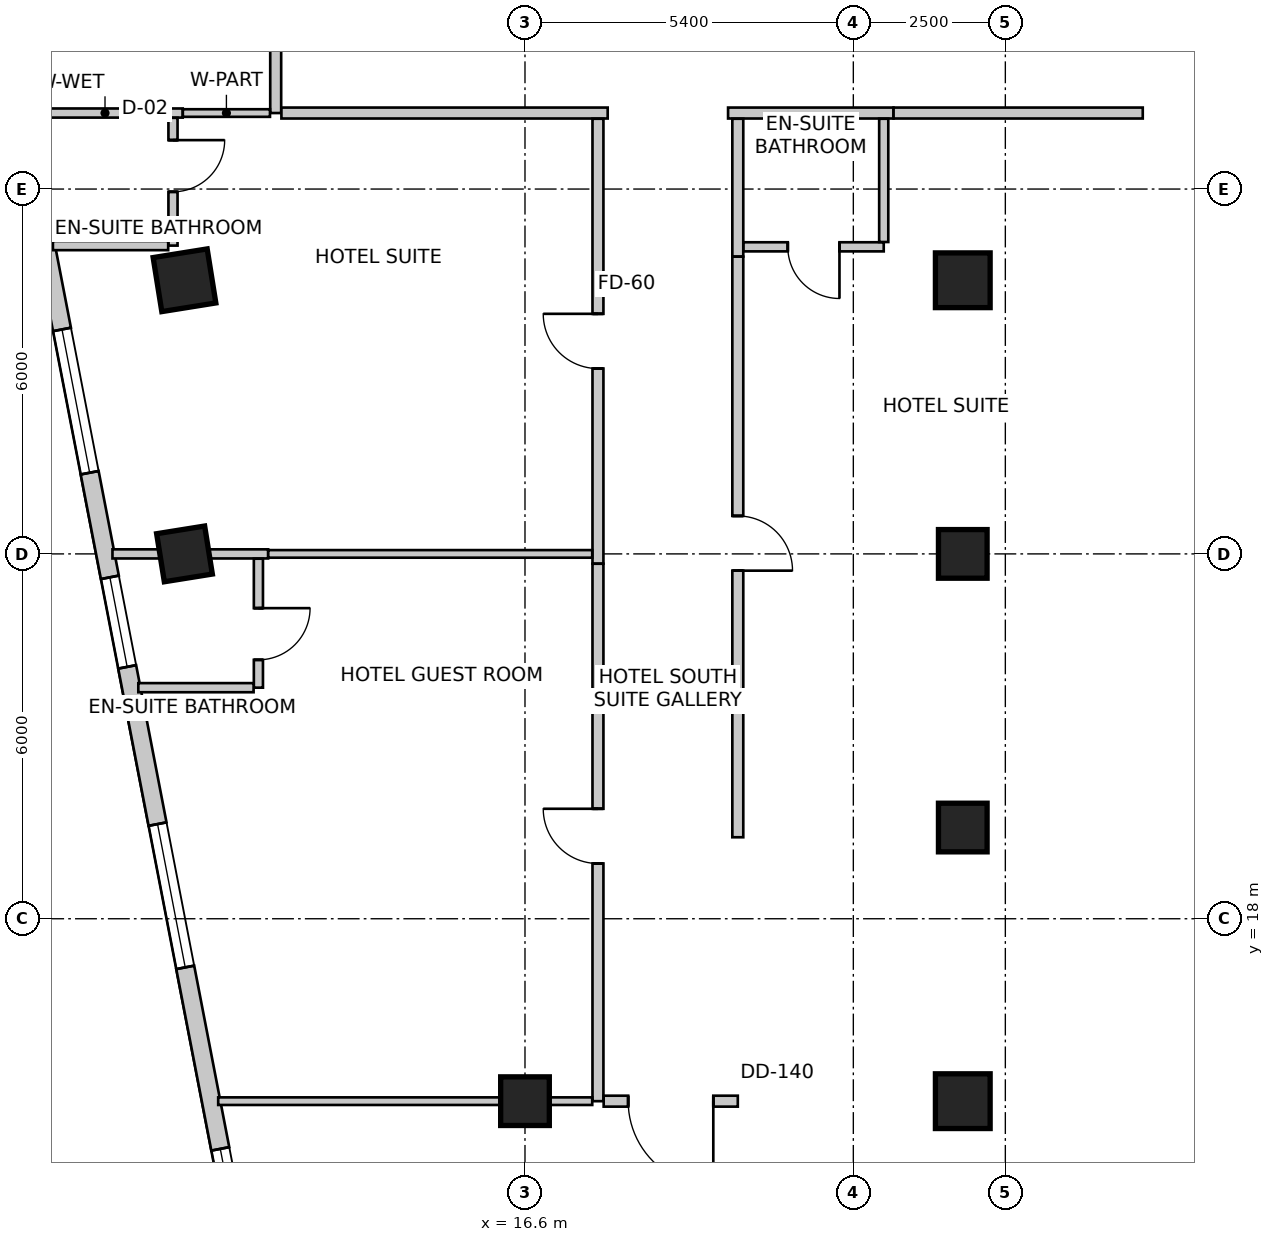
"""IFC4 building model, lengths in metres.
Left out: names, types, materials, properties, quantities, classifications, styles, units other than length and angle.
Written with IfcOpenShell. Run it as: python <this file> out.ifc"""

import sys

from ifc_helpers import new_model, si_unit, direction, frame, frame_2d, origin, origin_2d, place, context, subcontext, project, spatial, rectangle, extrude, source, transform, mapped, element, fill, save


model = new_model("IFC4")
c1 = context("Model", 3, precision=1e-05, world=origin(), true_north=direction((0.0, 1.0)))
c2 = subcontext(c1, "Body", "Model", "MODEL_VIEW")
j1 = project(units=[si_unit("LENGTHUNIT", "METRE"), si_unit("PLANEANGLEUNIT", "RADIAN")], contexts=[c1])
p1 = place(None, origin())
s1 = spatial("IfcSite", under=j1, at=p1, CompositionType="ELEMENT")
p2 = place(p1, origin())
s2 = spatial("IfcBuilding", under=s1, at=p2, CompositionType="ELEMENT")
p3 = place(p2, frame((0.0, 0.0, 135.8)))
s3 = spatial("IfcBuildingStorey", under=s2, at=p3, CompositionType="ELEMENT", Elevation=135.8)
m1 = source(origin(), c2, "Body", "SweptSolid", [
    extrude(rectangle(XDim=0.9, YDim=0.9, at=origin_2d()), origin(), (0.0, 0.0, 1.0), 3.6),
])
p4 = place(p3, frame((11.0, 28.5, 0.0), z_axis=(0.0, 0.0, 1.0), x_axis=(0.158158067254, -0.987413806751, 0.0)))
e1 = element("IfcColumn", 1, at=p4, inside=s3, PredefinedType="COLUMN", context=c2, shape_type="MappedRepresentation", body=[
    mapped(m1, transform((0.0, 0.0, 0.0), scale=1.0)),
])
m2 = source(origin(), c2, "Body", "SweptSolid", [
    extrude(rectangle(XDim=0.8, YDim=0.8, at=origin_2d()), origin(), (0.0, 0.0, 1.0), 3.6),
])
p5 = place(p3, frame((11.0, 24.0, 0.0), z_axis=(0.0, 0.0, 1.0), x_axis=(0.158158067254, -0.987413806751, 0.0)))
e2 = element("IfcColumn", 2, at=p5, inside=s3, PredefinedType="COLUMN", context=c2, shape_type="MappedRepresentation", body=[
    mapped(m2, transform((0.0, 0.0, 0.0), scale=1.0)),
])
p6 = place(p3, frame((23.8, 28.5, 0.0), z_axis=(0.0, 0.0, 1.0), x_axis=(1.0, 0.0, 0.0)))
e3 = element("IfcColumn", 3, at=p6, inside=s3, PredefinedType="COLUMN", context=c2, shape_type="MappedRepresentation", body=[
    mapped(m1, transform((0.0, 0.0, 0.0), scale=1.0)),
])
for number, where, z_axis, x_axis in (
    (4, (23.8, 24.0, 0.0), (0.0, 0.0, 1.0), (1.0, 0.0, 0.0)),
    (5, (23.8, 19.5, 0.0), (0.0, 0.0, 1.0), (1.0, 0.0, 0.0)),
):
    element("IfcColumn", number, at=place(p3, frame(where, z_axis=z_axis, x_axis=x_axis)), inside=s3, PredefinedType="COLUMN", context=c2, shape_type="MappedRepresentation", body=[
        mapped(m2, transform((0.0, 0.0, 0.0), scale=1.0)),
    ])
p7 = place(p3, frame((23.8, 15.0, 0.0), z_axis=(0.0, 0.0, 1.0), x_axis=(1.0, 0.0, 0.0)))
e6 = element("IfcColumn", 6, at=p7, inside=s3, PredefinedType="COLUMN", context=c2, shape_type="MappedRepresentation", body=[
    mapped(m1, transform((0.0, 0.0, 0.0), scale=1.0)),
])
p8 = place(p3, frame((16.6, 15.0, 0.0), z_axis=(0.0, 0.0, 1.0), x_axis=(1.0, 0.0, 0.0)))
e7 = element("IfcColumn", 7, at=p8, inside=s3, PredefinedType="COLUMN", context=c2, shape_type="MappedRepresentation", body=[
    mapped(m2, transform((0.0, 0.0, 0.0), scale=1.0)),
])
p9 = place(p3, frame((13.269, 47.134, 0.0), z_axis=(0.0, 0.0, 1.0), x_axis=(-0.319929596295, -0.947441319246, 0.0)))
e8 = element("IfcWall", 8, at=p9, inside=s3, PredefinedType="SOLIDWALL", context=c2, shape_type="SweptSolid", body=[
    extrude(rectangle(XDim=16.134, YDim=0.3, at=frame_2d((8.067, 0.0))), origin(), (0.0, 0.0, 1.0), 3.3),
])
m3 = source(origin(), c2, "Body", "SweptSolid", [
    extrude(rectangle(XDim=2.1, YDim=2.0, at=frame_2d((1.05, 1.0))), frame((0.0, 0.16, 0.0), z_axis=(0.0, -1.0, 0.0), x_axis=(1.0, 0.0, 0.0)), (0.0, 0.0, 1.0), 0.32),
])
p10 = place(p9, frame((2.426, 0.0, 0.85)))
e9 = element("IfcOpeningElement", 9, at=p10, cuts=e8, PredefinedType="OPENING", context=c2, shape_type="MappedRepresentation", body=[
    mapped(m3, transform((0.0, 0.0, 0.0), scale=1.0)),
])
m4 = source(origin(), c2, "Body", "SweptSolid", [
    extrude(rectangle(XDim=2.4, YDim=2.2, at=frame_2d((1.2, 1.1))), frame((0.0, 0.16, 0.0), z_axis=(0.0, -1.0, 0.0), x_axis=(1.0, 0.0, 0.0)), (0.0, 0.0, 1.0), 0.32),
])
p11 = place(p9, frame((7.211, 0.0, 0.85)))
e10 = element("IfcOpeningElement", 10, at=p11, cuts=e8, PredefinedType="OPENING", context=c2, shape_type="MappedRepresentation", body=[
    mapped(m4, transform((0.0, 0.0, 0.0), scale=1.0)),
])
p12 = place(p9, frame((12.297, 0.0, 0.85)))
e11 = element("IfcOpeningElement", 11, at=p12, cuts=e8, PredefinedType="OPENING", context=c2, shape_type="MappedRepresentation", body=[
    mapped(m3, transform((0.0, 0.0, 0.0), scale=1.0)),
])
p13 = place(p3, frame((8.185, 31.834, 0.0), z_axis=(0.0, 0.0, 1.0), x_axis=(0.189707113148, -0.981840725994, 0.0)))
e12 = element("IfcWall", 12, at=p13, inside=s3, PredefinedType="SOLIDWALL", context=c2, shape_type="SweptSolid", body=[
    extrude(rectangle(XDim=21.221, YDim=0.3, at=frame_2d((10.611, 0.0))), origin(), (0.0, 0.0, 1.0), 3.3),
])
m5 = source(origin(), c2, "Body", "SweptSolid", [
    extrude(rectangle(XDim=1.5, YDim=1.8, at=frame_2d((0.75, 0.9))), frame((0.0, 0.16, 0.0), z_axis=(0.0, -1.0, 0.0), x_axis=(1.0, 0.0, 0.0)), (0.0, 0.0, 1.0), 0.32),
])
p14 = place(p13, frame((0.977, 0.0, 0.85)))
e13 = element("IfcOpeningElement", 13, at=p14, cuts=e12, PredefinedType="OPENING", context=c2, shape_type="MappedRepresentation", body=[
    mapped(m5, transform((0.0, 0.0, 0.0), scale=1.0)),
])
p15 = place(p13, frame((4.219, 0.0, 0.85)))
e14 = element("IfcOpeningElement", 14, at=p15, cuts=e12, PredefinedType="OPENING", context=c2, shape_type="MappedRepresentation", body=[
    mapped(m4, transform((0.0, 0.0, 0.0), scale=1.0)),
])
p16 = place(p13, frame((8.371, 0.0, 0.85)))
e15 = element("IfcOpeningElement", 15, at=p16, cuts=e12, PredefinedType="OPENING", context=c2, shape_type="MappedRepresentation", body=[
    mapped(m5, transform((0.0, 0.0, 0.0), scale=1.0)),
])
p17 = place(p13, frame((12.504, 0.0, 0.85)))
e16 = element("IfcOpeningElement", 16, at=p17, cuts=e12, PredefinedType="OPENING", context=c2, shape_type="MappedRepresentation", body=[
    mapped(m4, transform((0.0, 0.0, 0.0), scale=1.0)),
])
p18 = place(p13, frame((17.944, 0.0, 0.85)))
e17 = element("IfcOpeningElement", 17, at=p18, cuts=e12, PredefinedType="OPENING", context=c2, shape_type="MappedRepresentation", body=[
    mapped(m4, transform((0.0, 0.0, 0.0), scale=1.0)),
])
p19 = place(p3, frame((12.5, 31.25, 0.0), z_axis=(0.0, 0.0, 1.0), x_axis=(0.0, 1.0, 0.0)))
e18 = element("IfcWall", 18, at=p19, inside=s3, PredefinedType="PARTITIONING", context=c2, shape_type="SweptSolid", body=[
    extrude(rectangle(XDim=2.2, YDim=0.18, at=frame_2d((1.1, 0.0))), origin(), (0.0, 0.0, 1.0), 2.885),
])
p20 = place(p3, frame((17.96, 31.25, 0.0), z_axis=(0.0, 0.0, 1.0), x_axis=(-1.0, 0.0, 0.0)))
e19 = element("IfcWall", 19, at=p20, inside=s3, PredefinedType="PARTITIONING", context=c2, shape_type="SweptSolid", body=[
    extrude(rectangle(XDim=5.366, YDim=0.18, at=frame_2d((2.683, 0.0))), origin(), (0.0, 0.0, 1.0), 2.885),
])
p21 = place(p3, frame((22.66, 31.25, 0.0), z_axis=(0.0, 0.0, 1.0), x_axis=(-1.0, 0.0, 0.0)))
e20 = element("IfcWall", 20, at=p21, inside=s3, PredefinedType="PARTITIONING", context=c2, shape_type="SweptSolid", body=[
    extrude(rectangle(XDim=2.72, YDim=0.18, at=frame_2d((1.36, 0.0))), origin(), (0.0, 0.0, 1.0), 2.885),
])
p22 = place(p3, frame((26.76, 31.25, 0.0), z_axis=(0.0, 0.0, 1.0), x_axis=(-1.0, 0.0, 0.0)))
e21 = element("IfcWall", 21, at=p22, inside=s3, PredefinedType="PARTITIONING", context=c2, shape_type="SweptSolid", body=[
    extrude(rectangle(XDim=4.098, YDim=0.18, at=frame_2d((2.049, 0.0))), origin(), (0.0, 0.0, 1.0), 3.3),
])
p23 = place(p3, frame((10.971, 31.25, 0.0), z_axis=(0.0, 0.0, 1.0), x_axis=(-1.0, 0.0, 0.0)))
e22 = element("IfcWall", 22, at=p23, inside=s3, PredefinedType="PARTITIONING", context=c2, shape_type="SweptSolid", body=[
    extrude(rectangle(XDim=2.556, YDim=0.15, at=frame_2d((1.278, 0.0))), origin(), (0.0, 0.0, 1.0), 2.442),
])
p24 = place(p3, frame((12.406, 31.25, 0.0), z_axis=(0.0, 0.0, 1.0), x_axis=(-1.0, 0.0, 0.0)))
e23 = element("IfcWall", 23, at=p24, inside=s3, PredefinedType="PARTITIONING", context=c2, shape_type="SweptSolid", body=[
    extrude(rectangle(XDim=1.433, YDim=0.125, at=frame_2d((0.717, 0.0))), origin(), (0.0, 0.0, 1.0), 2.442),
])
p25 = place(p3, frame((17.8, 23.84, 0.0), z_axis=(0.0, 0.0, 1.0), x_axis=(0.0, 1.0, 0.0)))
e24 = element("IfcWall", 24, at=p25, inside=s3, PredefinedType="PARTITIONING", context=c2, shape_type="SweptSolid", body=[
    extrude(rectangle(XDim=7.316, YDim=0.18, at=frame_2d((3.658, 0.0))), origin(), (0.0, 0.0, 1.0), 2.738),
])
m6 = source(origin(), c2, "Body", "SweptSolid", [
    extrude(rectangle(XDim=0.9, YDim=2.15, at=frame_2d((0.45, 1.075))), frame((0.0, 0.1, 0.0), z_axis=(0.0, -1.0, 0.0), x_axis=(1.0, 0.0, 0.0)), (0.0, 0.0, 1.0), 0.2),
])
p26 = place(p25, frame((3.208, 0.0, 0.0)))
e25 = element("IfcOpeningElement", 25, at=p26, cuts=e24, PredefinedType="OPENING", context=c2, shape_type="MappedRepresentation", body=[
    mapped(m6, transform((0.0, 0.0, 0.0), scale=1.0)),
])
p27 = place(p3, frame((17.8, 15.0, 0.0), z_axis=(0.0, 0.0, 1.0), x_axis=(0.0, 1.0, 0.0)))
e26 = element("IfcWall", 26, at=p27, inside=s3, PredefinedType="PARTITIONING", context=c2, shape_type="SweptSolid", body=[
    extrude(rectangle(XDim=8.838, YDim=0.18, at=frame_2d((4.419, 0.0))), origin(), (0.0, 0.0, 1.0), 2.442),
])
p28 = place(p27, frame((3.908, 0.0, 0.0)))
e27 = element("IfcOpeningElement", 27, at=p28, cuts=e26, PredefinedType="OPENING", context=c2, shape_type="MappedRepresentation", body=[
    mapped(m6, transform((0.0, 0.0, 0.0), scale=1.0)),
])
p29 = place(p3, frame((20.1, 31.156, 0.0), z_axis=(0.0, 0.0, 1.0), x_axis=(0.0, -1.0, 0.0)))
e28 = element("IfcWall", 28, at=p29, inside=s3, PredefinedType="PARTITIONING", context=c2, shape_type="SweptSolid", body=[
    extrude(rectangle(XDim=2.266, YDim=0.18, at=frame_2d((1.133, 0.0))), origin(), (0.0, 0.0, 1.0), 2.885),
])
p30 = place(p3, frame((20.1, 28.888, 0.0), z_axis=(0.0, 0.0, 1.0), x_axis=(0.0, -1.0, 0.0)))
e29 = element("IfcWall", 29, at=p30, inside=s3, PredefinedType="PARTITIONING", context=c2, shape_type="SweptSolid", body=[
    extrude(rectangle(XDim=9.548, YDim=0.18, at=frame_2d((4.774, 0.0))), origin(), (0.0, 0.0, 1.0), 2.738),
])
p31 = place(p30, frame((4.264, 0.0, 0.0)))
e30 = element("IfcOpeningElement", 30, at=p31, cuts=e29, PredefinedType="OPENING", context=c2, shape_type="MappedRepresentation", body=[
    mapped(m6, transform((0.0, 0.0, 0.0), scale=1.0)),
])
p32 = place(p3, frame((20.1, 15.0, 0.0), z_axis=(0.0, 0.0, 1.0), x_axis=(-1.0, 0.0, 0.0)))
e31 = element("IfcWall", 31, at=p32, inside=s3, PredefinedType="PARTITIONING", context=c2, shape_type="SweptSolid", body=[
    extrude(rectangle(XDim=2.206, YDim=0.18, at=frame_2d((1.103, 0.0))), origin(), (0.0, 0.0, 1.0), 2.442),
])
m7 = source(origin(), c2, "Body", "SweptSolid", [
    extrude(rectangle(XDim=1.4, YDim=2.15, at=frame_2d((0.7, 1.075))), frame((0.0, 0.1, 0.0), z_axis=(0.0, -1.0, 0.0), x_axis=(1.0, 0.0, 0.0)), (0.0, 0.0, 1.0), 0.2),
])
p33 = place(p32, frame((0.403, 0.0, 0.0)))
e32 = element("IfcOpeningElement", 32, at=p33, cuts=e31, PredefinedType="OPENING", context=c2, shape_type="MappedRepresentation", body=[
    mapped(m7, transform((0.0, 0.0, 0.0), scale=1.0)),
])
p34 = place(p3, frame((10.811, 31.171, 0.0), z_axis=(0.0, 0.0, 1.0), x_axis=(0.0, -1.0, 0.0)))
e33 = element("IfcWall", 33, at=p34, inside=s3, PredefinedType="PARTITIONING", context=c2, shape_type="SweptSolid", body=[
    extrude(rectangle(XDim=2.101, YDim=0.15, at=frame_2d((1.05, 0.0))), origin(), (0.0, 0.0, 1.0), 2.442),
])
m8 = source(origin(), c2, "Body", "SweptSolid", [
    extrude(rectangle(XDim=0.85, YDim=2.15, at=frame_2d((0.425, 1.075))), frame((0.0, 0.085, 0.0), z_axis=(0.0, -1.0, 0.0), x_axis=(1.0, 0.0, 0.0)), (0.0, 0.0, 1.0), 0.17),
])
p35 = place(p34, frame((0.366, 0.0, 0.0)))
e34 = element("IfcOpeningElement", 34, at=p35, cuts=e33, PredefinedType="OPENING", context=c2, shape_type="MappedRepresentation", body=[
    mapped(m8, transform((0.0, 0.0, 0.0), scale=1.0)),
])
p36 = place(p3, frame((10.732, 29.07, 0.0), z_axis=(0.0, 0.0, 1.0), x_axis=(-1.0, 0.0, 0.0)))
e35 = element("IfcWall", 35, at=p36, inside=s3, PredefinedType="PARTITIONING", context=c2, shape_type="SweptSolid", body=[
    extrude(rectangle(XDim=1.896, YDim=0.15, at=frame_2d((0.948, 0.0))), origin(), (0.0, 0.0, 1.0), 3.3),
])
p37 = place(p3, frame((12.375, 24.0, 0.0), z_axis=(0.0, 0.0, 1.0), x_axis=(-1.0, 0.0, 0.0)))
e36 = element("IfcWall", 36, at=p37, inside=s3, PredefinedType="PARTITIONING", context=c2, shape_type="SweptSolid", body=[
    extrude(rectangle(XDim=2.56, YDim=0.15, at=frame_2d((1.28, 0.0))), origin(), (0.0, 0.0, 1.0), 2.442),
])
p38 = place(p3, frame((17.706, 24.0, 0.0), z_axis=(0.0, 0.0, 1.0), x_axis=(-1.0, 0.0, 0.0)))
e37 = element("IfcWall", 37, at=p38, inside=s3, PredefinedType="PARTITIONING", context=c2, shape_type="SweptSolid", body=[
    extrude(rectangle(XDim=5.328, YDim=0.125, at=frame_2d((2.664, 0.0))), origin(), (0.0, 0.0, 1.0), 2.753),
])
p39 = place(p3, frame((12.216, 23.921, 0.0), z_axis=(0.0, 0.0, 1.0), x_axis=(0.0, -1.0, 0.0)))
e38 = element("IfcWall", 38, at=p39, inside=s3, PredefinedType="PARTITIONING", context=c2, shape_type="SweptSolid", body=[
    extrude(rectangle(XDim=2.121, YDim=0.15, at=frame_2d((1.061, 0.0))), origin(), (0.0, 0.0, 1.0), 2.738),
])
p40 = place(p39, frame((0.813, 0.0, 0.0)))
e39 = element("IfcOpeningElement", 39, at=p40, cuts=e38, PredefinedType="OPENING", context=c2, shape_type="MappedRepresentation", body=[
    mapped(m8, transform((0.0, 0.0, 0.0), scale=1.0)),
])
p41 = place(p3, frame((12.137, 21.8, 0.0), z_axis=(0.0, 0.0, 1.0), x_axis=(-1.0, 0.0, 0.0)))
e40 = element("IfcWall", 40, at=p41, inside=s3, PredefinedType="PARTITIONING", context=c2, shape_type="SweptSolid", body=[
    extrude(rectangle(XDim=1.896, YDim=0.15, at=frame_2d((0.948, 0.0))), origin(), (0.0, 0.0, 1.0), 3.3),
])
p42 = place(p3, frame((17.706, 15.0, 0.0), z_axis=(0.0, 0.0, 1.0), x_axis=(-1.0, 0.0, 0.0)))
e41 = element("IfcWall", 41, at=p42, inside=s3, PredefinedType="PARTITIONING", context=c2, shape_type="SweptSolid", body=[
    extrude(rectangle(XDim=6.152, YDim=0.125, at=frame_2d((3.076, 0.0))), origin(), (0.0, 0.0, 1.0), 2.442),
])
p43 = place(p3, frame((22.5, 29.05, 0.0), z_axis=(0.0, 0.0, 1.0), x_axis=(-1.0, 0.0, 0.0)))
e42 = element("IfcWall", 42, at=p43, inside=s3, PredefinedType="PARTITIONING", context=c2, shape_type="SweptSolid", body=[
    extrude(rectangle(XDim=2.306, YDim=0.15, at=frame_2d((1.153, 0.0))), origin(), (0.0, 0.0, 1.0), 2.885),
])
p44 = place(p43, frame((0.728, 0.0, 0.0)))
e43 = element("IfcOpeningElement", 43, at=p44, cuts=e42, PredefinedType="OPENING", context=c2, shape_type="MappedRepresentation", body=[
    mapped(m8, transform((0.0, 0.0, 0.0), scale=1.0)),
])
p45 = place(p3, frame((22.5, 31.156, 0.0), z_axis=(0.0, 0.0, 1.0), x_axis=(0.0, -1.0, 0.0)))
e44 = element("IfcWall", 44, at=p45, inside=s3, PredefinedType="PARTITIONING", context=c2, shape_type="SweptSolid", body=[
    extrude(rectangle(XDim=2.027, YDim=0.15, at=frame_2d((1.014, 0.0))), origin(), (0.0, 0.0, 1.0), 2.885),
])
m9 = source(origin(), c2, "Body", "SweptSolid", [
    extrude(rectangle(XDim=2.4, YDim=2.2, at=frame_2d((1.2, 1.1))), frame((0.0, -0.015, 0.0), z_axis=(0.0, -1.0, 0.0), x_axis=(1.0, 0.0, 0.0)), (0.0, 0.0, 1.0), 0.06),
])
p46 = place(p15, origin())
e45 = element("IfcWindow", 45, at=p46, inside=s3, PartitioningType="SINGLE_PANEL", PredefinedType="WINDOW", context=c2, shape_type="MappedRepresentation", body=[
    mapped(m9, transform((0.0, 0.0, 0.0), scale=1.0)),
])
fill(e14, e45)
m10 = source(origin(), c2, "Body", "SweptSolid", [
    extrude(rectangle(XDim=1.5, YDim=1.8, at=frame_2d((0.75, 0.9))), frame((0.0, -0.015, 0.0), z_axis=(0.0, -1.0, 0.0), x_axis=(1.0, 0.0, 0.0)), (0.0, 0.0, 1.0), 0.06),
])
p47 = place(p16, origin())
e46 = element("IfcWindow", 46, at=p47, inside=s3, PartitioningType="SINGLE_PANEL", PredefinedType="WINDOW", context=c2, shape_type="MappedRepresentation", body=[
    mapped(m10, transform((0.0, 0.0, 0.0), scale=1.0)),
])
fill(e15, e46)
p48 = place(p17, origin())
e47 = element("IfcWindow", 47, at=p48, inside=s3, PartitioningType="SINGLE_PANEL", PredefinedType="WINDOW", context=c2, shape_type="MappedRepresentation", body=[
    mapped(m9, transform((0.0, 0.0, 0.0), scale=1.0)),
])
fill(e16, e47)
p49 = place(p18, origin())
e48 = element("IfcWindow", 48, at=p49, inside=s3, PartitioningType="SINGLE_PANEL", PredefinedType="WINDOW", context=c2, shape_type="MappedRepresentation", body=[
    mapped(m9, transform((0.0, 0.0, 0.0), scale=1.0)),
])
fill(e17, e48)
m11 = source(origin(), c2, "Body", "SweptSolid", [
    extrude(rectangle(XDim=0.85, YDim=2.15, at=frame_2d((0.425, 1.075))), frame((0.0, 0.025, 0.0), z_axis=(0.0, -1.0, 0.0), x_axis=(1.0, 0.0, 0.0)), (0.0, 0.0, 1.0), 0.05),
])
p50 = place(p35, origin())
e49 = element("IfcDoor", 49, at=p50, inside=s3, OperationType="SINGLE_SWING_LEFT", PredefinedType="DOOR", context=c2, shape_type="MappedRepresentation", body=[
    mapped(m11, transform((0.0, 0.0, 0.0), scale=1.0)),
])
fill(e34, e49)
m12 = source(origin(), c2, "Body", "SweptSolid", [
    extrude(rectangle(XDim=0.9, YDim=2.15, at=frame_2d((0.45, 1.075))), frame((0.0, 0.025, 0.0), z_axis=(0.0, -1.0, 0.0), x_axis=(1.0, 0.0, 0.0)), (0.0, 0.0, 1.0), 0.05),
])
p51 = place(p26, origin())
e50 = element("IfcDoor", 50, at=p51, inside=s3, OperationType="SINGLE_SWING_RIGHT", PredefinedType="DOOR", context=c2, shape_type="MappedRepresentation", body=[
    mapped(m12, transform((0.0, 0.0, 0.0), scale=1.0)),
])
fill(e25, e50)
p52 = place(p40, origin())
e51 = element("IfcDoor", 51, at=p52, inside=s3, OperationType="SINGLE_SWING_LEFT", PredefinedType="DOOR", context=c2, shape_type="MappedRepresentation", body=[
    mapped(m11, transform((0.0, 0.0, 0.0), scale=1.0)),
])
fill(e39, e51)
p53 = place(p28, origin())
e52 = element("IfcDoor", 52, at=p53, inside=s3, OperationType="SINGLE_SWING_RIGHT", PredefinedType="DOOR", context=c2, shape_type="MappedRepresentation", body=[
    mapped(m12, transform((0.0, 0.0, 0.0), scale=1.0)),
])
fill(e27, e52)
p54 = place(p44, origin())
e53 = element("IfcDoor", 53, at=p54, inside=s3, OperationType="SINGLE_SWING_LEFT", PredefinedType="DOOR", context=c2, shape_type="MappedRepresentation", body=[
    mapped(m11, transform((0.0, 0.0, 0.0), scale=1.0)),
])
fill(e43, e53)
p55 = place(p31, origin())
e54 = element("IfcDoor", 54, at=p55, inside=s3, OperationType="SINGLE_SWING_RIGHT", PredefinedType="DOOR", context=c2, shape_type="MappedRepresentation", body=[
    mapped(m12, transform((0.0, 0.0, 0.0), scale=1.0)),
])
fill(e30, e54)
m13 = source(origin(), c2, "Body", "SweptSolid", [
    extrude(rectangle(XDim=1.4, YDim=2.15, at=frame_2d((0.7, 1.075))), frame((0.0, 0.025, 0.0), z_axis=(0.0, -1.0, 0.0), x_axis=(1.0, 0.0, 0.0)), (0.0, 0.0, 1.0), 0.05),
])
p56 = place(p33, origin())
e55 = element("IfcDoor", 55, at=p56, inside=s3, OperationType="SINGLE_SWING_LEFT", PredefinedType="DOOR", context=c2, shape_type="MappedRepresentation", body=[
    mapped(m13, transform((0.0, 0.0, 0.0), scale=1.0)),
])
fill(e32, e55)
save(model, sys.argv[1])
